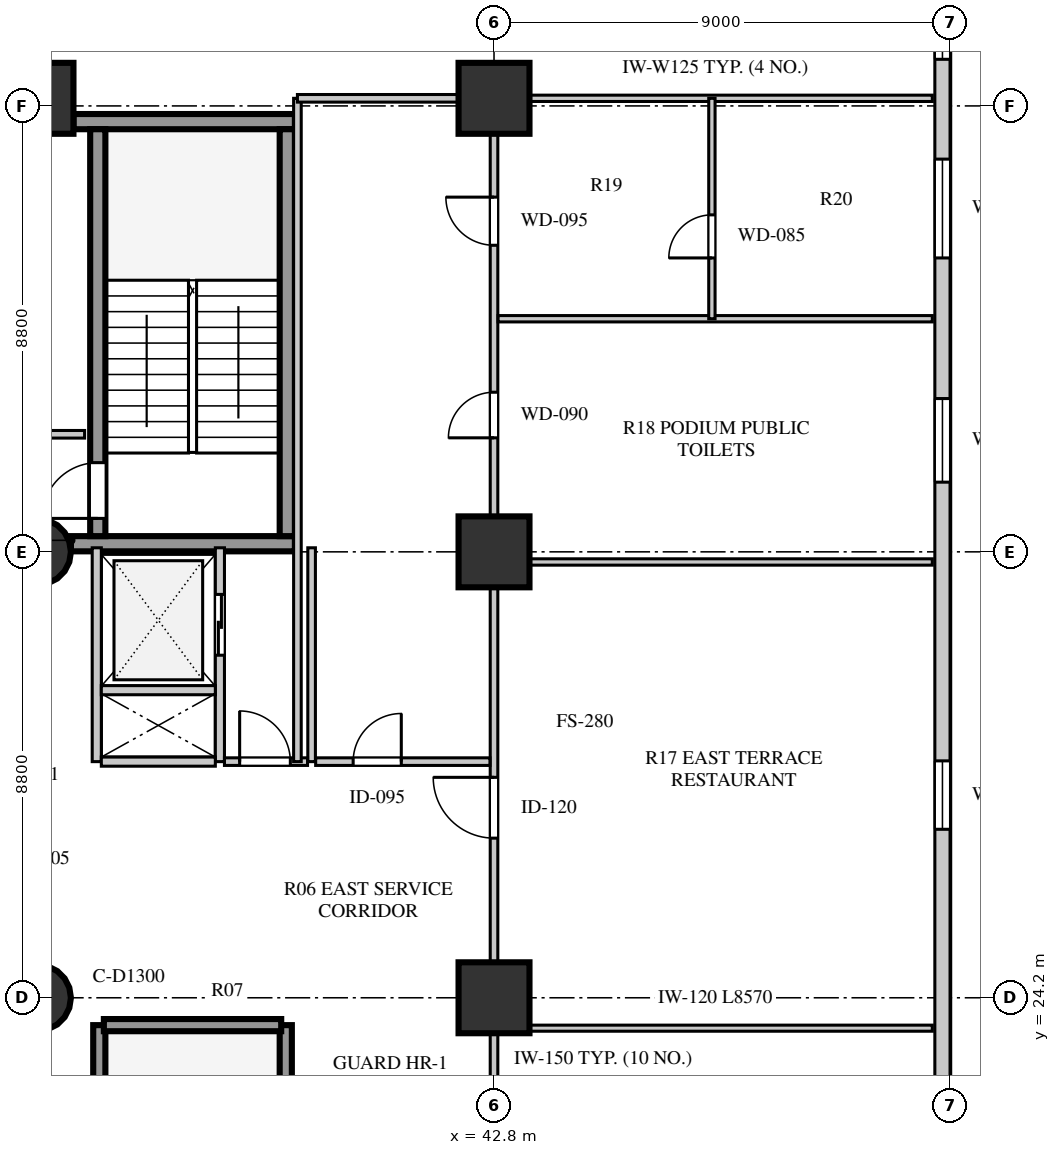
"""IFC4 building model, lengths in metres.
Left out: names, types, materials, properties, quantities, classifications, styles, units other than length and angle.
Written with IfcOpenShell. Run it as: python <this file> out.ifc"""

import sys

from ifc_helpers import new_model, si_unit, direction, frame, frame_2d, origin, origin_2d, place, context, subcontext, project, spatial, rectangle, circle, extrude, element, fill, save


model = new_model("IFC4")
c1 = context("Model", 3, precision=1e-05, world=origin(), true_north=direction((0.0, 1.0)))
c2 = subcontext(c1, "Body", "Model", "MODEL_VIEW")
j1 = project(units=[si_unit("LENGTHUNIT", "METRE"), si_unit("PLANEANGLEUNIT", "RADIAN")], contexts=[c1])
p1 = place(None, origin())
s1 = spatial("IfcSite", under=j1, at=p1, CompositionType="ELEMENT")
p2 = place(p1, origin())
s2 = spatial("IfcBuilding", under=s1, at=p2, CompositionType="ELEMENT")
p3 = place(p2, frame((0.0, 0.0, 8.0)))
s3 = spatial("IfcBuildingStorey", under=s2, at=p3, CompositionType="ELEMENT", Elevation=8.0)
p4 = place(p3, frame((34.45, 33.16, 0.0), z_axis=(0.0, 0.0, 1.0), x_axis=(1.0, 0.0, 0.0)))
e1 = element("IfcWall", 1, at=p4, inside=s3, PredefinedType="SHEAR", context=c2, shape_type="SweptSolid", body=[
    extrude(rectangle(XDim=4.42, YDim=0.3, at=frame_2d((2.21, 0.0))), origin(), (0.0, 0.0, 1.0), 4.22),
])
p5 = place(p3, frame((34.5, 41.49, 0.0), z_axis=(0.0, 0.0, 1.0), x_axis=(1.0, 0.0, 0.0)))
e2 = element("IfcWall", 2, at=p5, inside=s3, PredefinedType="SHEAR", context=c2, shape_type="SweptSolid", body=[
    extrude(rectangle(XDim=4.37, YDim=0.3, at=frame_2d((2.185, 0.0))), origin(), (0.0, 0.0, 1.0), 4.22),
])
p6 = place(p3, frame((34.98, 33.31, 0.0), z_axis=(0.0, 0.0, 1.0), x_axis=(0.0, 1.0, 0.0)))
e3 = element("IfcWall", 3, at=p6, inside=s3, PredefinedType="SHEAR", context=c2, shape_type="SweptSolid", body=[
    extrude(rectangle(XDim=8.03, YDim=0.3, at=frame_2d((4.015, 0.0))), origin(), (0.0, 0.0, 1.0), 4.22),
])
p7 = place(p6, frame((0.35, 0.0, 0.0)))
e4 = element("IfcOpeningElement", 4, at=p7, cuts=e3, PredefinedType="OPENING", context=c2, shape_type="SweptSolid", body=[
    extrude(rectangle(XDim=1.1, YDim=2.1, at=frame_2d((0.55, 1.05))), frame((0.0, 0.16, 0.0), z_axis=(0.0, -1.0, 0.0), x_axis=(1.0, 0.0, 0.0)), (0.0, 0.0, 1.0), 0.32),
])
p8 = place(p3, frame((38.72, 33.31, 0.0), z_axis=(0.0, 0.0, 1.0), x_axis=(0.0, 1.0, 0.0)))
e5 = element("IfcWall", 5, at=p8, inside=s3, PredefinedType="SHEAR", context=c2, shape_type="SweptSolid", body=[
    extrude(rectangle(XDim=8.03, YDim=0.3, at=frame_2d((4.015, 0.0))), origin(), (0.0, 0.0, 1.0), 4.22),
])
for number, where, z_axis, x_axis in (
    (6, (33.8, 24.2, 0.0), (0.0, 0.0, 1.0), (1.0, 0.0, 0.0)),
    (7, (33.8, 33.0, 0.0), (0.0, 0.0, 1.0), (1.0, 0.0, 0.0)),
):
    element("IfcColumn", number, at=place(p3, frame(where, z_axis=z_axis, x_axis=x_axis)), inside=s3, PredefinedType="COLUMN", context=c2, shape_type="SweptSolid", body=[
        extrude(circle(Radius=0.65, at=origin_2d()), origin(), (0.0, 0.0, 1.0), 4.22),
    ])
for number, where, z_axis, x_axis in (
    (8, (33.8, 41.95, 0.0), (0.0, 0.0, 1.0), (1.0, 0.0, 0.0)),
    (9, (42.8, 24.2, 0.0), (0.0, 0.0, 1.0), (1.0, 0.0, 0.0)),
    (10, (42.8, 33.0, 0.0), (0.0, 0.0, 1.0), (1.0, 0.0, 0.0)),
    (11, (42.8, 41.95, 0.0), (0.0, 0.0, 1.0), (1.0, 0.0, 0.0)),
):
    element("IfcColumn", number, at=place(p3, frame(where, z_axis=z_axis, x_axis=x_axis)), inside=s3, PredefinedType="COLUMN", context=c2, shape_type="SweptSolid", body=[
        extrude(rectangle(XDim=1.4, YDim=1.4, at=origin_2d()), origin(), (0.0, 0.0, 1.0), 4.22),
    ])
p9 = place(p3, frame((51.65, 12.4, 0.0), z_axis=(0.0, 0.0, 1.0), x_axis=(0.0, 1.0, 0.0)))
e12 = element("IfcWall", 12, at=p9, inside=s3, PredefinedType="STANDARD", context=c2, shape_type="SweptSolid", body=[
    extrude(rectangle(XDim=32.4, YDim=0.3, at=frame_2d((16.2, 0.0))), origin(), (0.0, 0.0, 1.0), 4.22),
])
p10 = place(p9, frame((0.88, 0.0, 0.8)))
e13 = element("IfcOpeningElement", 13, at=p10, cuts=e12, PredefinedType="OPENING", context=c2, shape_type="SweptSolid", body=[
    extrude(rectangle(XDim=1.2, YDim=1.75, at=frame_2d((0.6, 0.875))), frame((0.0, 0.16, 0.0), z_axis=(0.0, -1.0, 0.0), x_axis=(1.0, 0.0, 0.0)), (0.0, 0.0, 1.0), 0.32),
])
p11 = place(p9, frame((5.975, 0.0, 0.8)))
e14 = element("IfcOpeningElement", 14, at=p11, cuts=e12, PredefinedType="OPENING", context=c2, shape_type="SweptSolid", body=[
    extrude(rectangle(XDim=2.1, YDim=1.95, at=frame_2d((1.05, 0.975))), frame((0.0, 0.16, 0.0), z_axis=(0.0, -1.0, 0.0), x_axis=(1.0, 0.0, 0.0)), (0.0, 0.0, 1.0), 0.32),
])
p12 = place(p9, frame((15.125, 0.0, 0.8)))
e15 = element("IfcOpeningElement", 15, at=p12, cuts=e12, PredefinedType="OPENING", context=c2, shape_type="SweptSolid", body=[
    extrude(rectangle(XDim=1.35, YDim=1.9, at=frame_2d((0.675, 0.95))), frame((0.0, 0.16, 0.0), z_axis=(0.0, -1.0, 0.0), x_axis=(1.0, 0.0, 0.0)), (0.0, 0.0, 1.0), 0.32),
])
p13 = place(p9, frame((21.975, 0.0, 0.8)))
e16 = element("IfcOpeningElement", 16, at=p13, cuts=e12, PredefinedType="OPENING", context=c2, shape_type="SweptSolid", body=[
    extrude(rectangle(XDim=1.65, YDim=1.95, at=frame_2d((0.825, 0.975))), frame((0.0, 0.16, 0.0), z_axis=(0.0, -1.0, 0.0), x_axis=(1.0, 0.0, 0.0)), (0.0, 0.0, 1.0), 0.32),
])
p14 = place(p9, frame((26.4, 0.0, 0.8)))
e17 = element("IfcOpeningElement", 17, at=p14, cuts=e12, PredefinedType="OPENING", context=c2, shape_type="SweptSolid", body=[
    extrude(rectangle(XDim=1.95, YDim=2.0, at=frame_2d((0.975, 1.0))), frame((0.0, 0.16, 0.0), z_axis=(0.0, -1.0, 0.0), x_axis=(1.0, 0.0, 0.0)), (0.0, 0.0, 1.0), 0.32),
])
p15 = place(p9, frame((30.32, 0.0, 0.8)))
e18 = element("IfcOpeningElement", 18, at=p15, cuts=e12, PredefinedType="OPENING", context=c2, shape_type="SweptSolid", body=[
    extrude(rectangle(XDim=1.2, YDim=1.75, at=frame_2d((0.6, 0.875))), frame((0.0, 0.16, 0.0), z_axis=(0.0, -1.0, 0.0), x_axis=(1.0, 0.0, 0.0)), (0.0, 0.0, 1.0), 0.32),
])
p16 = place(p3, frame((34.96, 28.86, 0.0), z_axis=(0.0, 0.0, 1.0), x_axis=(0.0, 1.0, 0.0)))
e19 = element("IfcWall", 19, at=p16, inside=s3, PredefinedType="SOLIDWALL", context=c2, shape_type="SweptSolid", body=[
    extrude(rectangle(XDim=4.22, YDim=0.18, at=frame_2d((2.11, 0.0))), origin(), (0.0, 0.0, 1.0), 4.22),
])
p17 = place(p3, frame((37.39, 28.86, 0.0), z_axis=(0.0, 0.0, 1.0), x_axis=(0.0, 1.0, 0.0)))
e20 = element("IfcWall", 20, at=p17, inside=s3, PredefinedType="SOLIDWALL", context=c2, shape_type="SweptSolid", body=[
    extrude(rectangle(XDim=4.22, YDim=0.18, at=frame_2d((2.11, 0.0))), origin(), (0.0, 0.0, 1.0), 4.22),
])
p18 = place(p17, frame((2.1, 0.0, 0.0)))
e21 = element("IfcOpeningElement", 21, at=p18, cuts=e20, PredefinedType="OPENING", context=c2, shape_type="SweptSolid", body=[
    extrude(rectangle(XDim=1.2, YDim=2.12, at=frame_2d((0.6, 1.06))), frame((0.0, 0.1, 0.0), z_axis=(0.0, -1.0, 0.0), x_axis=(1.0, 0.0, 0.0)), (0.0, 0.0, 1.0), 0.2),
])
for number, where, z_axis, x_axis in (
    (22, (35.05, 28.86, 0.0), (0.0, 0.0, 1.0), (1.0, 0.0, 0.0)),
    (23, (35.05, 30.27, 0.0), (0.0, 0.0, 1.0), (1.0, 0.0, 0.0)),
):
    element("IfcWall", number, at=place(p3, frame(where, z_axis=z_axis, x_axis=x_axis)), inside=s3, PredefinedType="SOLIDWALL", context=c2, shape_type="SweptSolid", body=[
        extrude(rectangle(XDim=2.25, YDim=0.18, at=frame_2d((1.125, 0.0))), origin(), (0.0, 0.0, 1.0), 4.22),
    ])
p19 = place(p3, frame((39.2, 28.86, 0.0), z_axis=(0.0, 0.0, 1.0), x_axis=(0.0, 1.0, 0.0)))
e24 = element("IfcWall", 24, at=p19, inside=s3, PredefinedType="PARTITIONING", context=c2, shape_type="SweptSolid", body=[
    extrude(rectangle(XDim=4.22, YDim=0.15, at=frame_2d((2.11, 0.0))), origin(), (0.0, 0.0, 1.0), 4.22),
])
p20 = place(p3, frame((37.48, 28.86, 0.0), z_axis=(0.0, 0.0, 1.0), x_axis=(1.0, 0.0, 0.0)))
e25 = element("IfcWall", 25, at=p20, inside=s3, PredefinedType="PARTITIONING", context=c2, shape_type="SweptSolid", body=[
    extrude(rectangle(XDim=1.64, YDim=0.15, at=frame_2d((0.82, 0.0))), origin(), (0.0, 0.0, 1.0), 4.22),
])
p21 = place(p20, frame((0.3, 0.0, 0.0)))
e26 = element("IfcOpeningElement", 26, at=p21, cuts=e25, PredefinedType="OPENING", context=c2, shape_type="SweptSolid", body=[
    extrude(rectangle(XDim=1.0, YDim=2.1, at=frame_2d((0.5, 1.05))), frame((0.0, 0.085, 0.0), z_axis=(0.0, -1.0, 0.0), x_axis=(1.0, 0.0, 0.0)), (0.0, 0.0, 1.0), 0.17),
])
p22 = place(p3, frame((35.01, 15.54, 0.0), z_axis=(0.0, 0.0, 1.0), x_axis=(0.0, 1.0, 0.0)))
e27 = element("IfcWall", 27, at=p22, inside=s3, PredefinedType="SHEAR", context=c2, shape_type="SweptSolid", body=[
    extrude(rectangle(XDim=8.12, YDim=0.24, at=frame_2d((4.06, 0.0))), origin(), (0.0, 0.0, 1.0), 4.5),
])
p23 = place(p22, frame((0.45, 0.0, 0.0)))
e28 = element("IfcOpeningElement", 28, at=p23, cuts=e27, PredefinedType="OPENING", context=c2, shape_type="SweptSolid", body=[
    extrude(rectangle(XDim=1.1, YDim=2.1, at=frame_2d((0.55, 1.05))), frame((0.0, 0.13, 0.0), z_axis=(0.0, -1.0, 0.0), x_axis=(1.0, 0.0, 0.0)), (0.0, 0.0, 1.0), 0.26),
])
p24 = place(p3, frame((38.69, 15.54, 0.0), z_axis=(0.0, 0.0, 1.0), x_axis=(0.0, 1.0, 0.0)))
e29 = element("IfcWall", 29, at=p24, inside=s3, PredefinedType="SHEAR", context=c2, shape_type="SweptSolid", body=[
    extrude(rectangle(XDim=8.12, YDim=0.24, at=frame_2d((4.06, 0.0))), origin(), (0.0, 0.0, 1.0), 4.5),
])
p25 = place(p3, frame((35.1, 23.66, 0.0), z_axis=(0.0, 0.0, 1.0), x_axis=(1.0, 0.0, 0.0)))
e30 = element("IfcWall", 30, at=p25, inside=s3, PredefinedType="SHEAR", context=c2, shape_type="SweptSolid", body=[
    extrude(rectangle(XDim=3.5, YDim=0.24, at=frame_2d((1.75, 0.0))), origin(), (0.0, 0.0, 1.0), 4.5),
])
p26 = place(p3, frame((27.5, 35.32, 0.0), z_axis=(0.0, 0.0, 1.0), x_axis=(1.0, 0.0, 0.0)))
e31 = element("IfcWall", 31, at=p26, inside=s3, PredefinedType="PARTITIONING", context=c2, shape_type="SweptSolid", body=[
    extrude(rectangle(XDim=7.22, YDim=0.15, at=frame_2d((3.61, 0.0))), origin(), (0.0, 0.0, 1.0), 4.22),
])
p27 = place(p26, frame((2.4, 0.0, 0.0)))
e32 = element("IfcOpeningElement", 32, at=p27, cuts=e31, PredefinedType="OPENING", context=c2, shape_type="SweptSolid", body=[
    extrude(rectangle(XDim=1.2, YDim=2.1, at=frame_2d((0.6, 1.05))), frame((0.0, 0.085, 0.0), z_axis=(0.0, -1.0, 0.0), x_axis=(1.0, 0.0, 0.0)), (0.0, 0.0, 1.0), 0.17),
])
p28 = place(p3, frame((42.8, 15.25, 0.0), z_axis=(0.0, 0.0, 1.0), x_axis=(0.0, 1.0, 0.0)))
e33 = element("IfcWall", 33, at=p28, inside=s3, PredefinedType="PARTITIONING", context=c2, shape_type="SweptSolid", body=[
    extrude(rectangle(XDim=26.7, YDim=0.15, at=frame_2d((13.35, 0.0))), origin(), (0.0, 0.0, 1.0), 3.42),
])
p29 = place(p28, frame((3.2, 0.0, 0.0)))
e34 = element("IfcOpeningElement", 34, at=p29, cuts=e33, PredefinedType="OPENING", context=c2, shape_type="SweptSolid", body=[
    extrude(rectangle(XDim=1.1, YDim=2.08, at=frame_2d((0.55, 1.04))), frame((0.0, 0.085, 0.0), z_axis=(0.0, -1.0, 0.0), x_axis=(1.0, 0.0, 0.0)), (0.0, 0.0, 1.0), 0.17),
])
p30 = place(p28, frame((12.1, 0.0, 0.0)))
e35 = element("IfcOpeningElement", 35, at=p30, cuts=e33, PredefinedType="OPENING", context=c2, shape_type="SweptSolid", body=[
    extrude(rectangle(XDim=1.2, YDim=2.1, at=frame_2d((0.6, 1.05))), frame((0.0, 0.085, 0.0), z_axis=(0.0, -1.0, 0.0), x_axis=(1.0, 0.0, 0.0)), (0.0, 0.0, 1.0), 0.17),
])
p31 = place(p28, frame((20.0, 0.0, 0.0)))
e36 = element("IfcOpeningElement", 36, at=p31, cuts=e33, PredefinedType="OPENING", context=c2, shape_type="SweptSolid", body=[
    extrude(rectangle(XDim=0.9, YDim=2.05, at=frame_2d((0.45, 1.025))), frame((0.0, 0.085, 0.0), z_axis=(0.0, -1.0, 0.0), x_axis=(1.0, 0.0, 0.0)), (0.0, 0.0, 1.0), 0.17),
])
p32 = place(p28, frame((23.8, 0.0, 0.0)))
e37 = element("IfcOpeningElement", 37, at=p32, cuts=e33, PredefinedType="OPENING", context=c2, shape_type="SweptSolid", body=[
    extrude(rectangle(XDim=0.95, YDim=2.05, at=frame_2d((0.475, 1.025))), frame((0.0, 0.085, 0.0), z_axis=(0.0, -1.0, 0.0), x_axis=(1.0, 0.0, 0.0)), (0.0, 0.0, 1.0), 0.17),
])
p33 = place(p3, frame((42.88, 41.95, 0.0), z_axis=(0.0, 0.0, 1.0), x_axis=(1.0, 0.0, 0.0)))
e38 = element("IfcWall", 38, at=p33, inside=s3, PredefinedType="PLUMBINGWALL", context=c2, shape_type="SweptSolid", body=[
    extrude(rectangle(XDim=8.57, YDim=0.125, at=frame_2d((4.285, 0.0))), origin(), (0.0, 0.0, 1.0), 3.72),
])
p34 = place(p3, frame((39.28, 28.86, 0.0), z_axis=(0.0, 0.0, 1.0), x_axis=(1.0, 0.0, 0.0)))
e39 = element("IfcWall", 39, at=p34, inside=s3, PredefinedType="PARTITIONING", context=c2, shape_type="SweptSolid", body=[
    extrude(rectangle(XDim=3.44, YDim=0.15, at=frame_2d((1.72, 0.0))), origin(), (0.0, 0.0, 1.0), 4.22),
])
p35 = place(p34, frame((0.74, 0.0, 0.0)))
e40 = element("IfcOpeningElement", 40, at=p35, cuts=e39, PredefinedType="OPENING", context=c2, shape_type="SweptSolid", body=[
    extrude(rectangle(XDim=0.95, YDim=2.08, at=frame_2d((0.475, 1.04))), frame((0.0, 0.085, 0.0), z_axis=(0.0, -1.0, 0.0), x_axis=(1.0, 0.0, 0.0)), (0.0, 0.0, 1.0), 0.17),
])
p36 = place(p3, frame((38.92, 28.86, 0.0), z_axis=(0.0, 0.0, 1.0), x_axis=(0.0, 1.0, 0.0)))
e41 = element("IfcWall", 41, at=p36, inside=s3, PredefinedType="PARTITIONING", context=c2, shape_type="SweptSolid", body=[
    extrude(rectangle(XDim=13.09, YDim=0.15, at=frame_2d((6.545, 0.0))), origin(), (0.0, 0.0, 1.0), 4.22),
])
p37 = place(p3, frame((38.92, 41.95, 0.0), z_axis=(0.0, 0.0, 1.0), x_axis=(1.0, 0.0, 0.0)))
e42 = element("IfcWall", 42, at=p37, inside=s3, PredefinedType="PARTITIONING", context=c2, shape_type="SweptSolid", body=[
    extrude(rectangle(XDim=3.88, YDim=0.15, at=frame_2d((1.94, 0.0))), origin(), (0.0, 0.0, 1.0), 3.42),
])
p38 = place(p3, frame((42.88, 23.6, 0.0), z_axis=(0.0, 0.0, 1.0), x_axis=(1.0, 0.0, 0.0)))
e43 = element("IfcWall", 43, at=p38, inside=s3, PredefinedType="PARTITIONING", context=c2, shape_type="SweptSolid", body=[
    extrude(rectangle(XDim=8.57, YDim=0.12, at=frame_2d((4.285, 0.0))), origin(), (0.0, 0.0, 1.0), 4.22),
])
p39 = place(p3, frame((42.88, 32.8, 0.0), z_axis=(0.0, 0.0, 1.0), x_axis=(1.0, 0.0, 0.0)))
e44 = element("IfcWall", 44, at=p39, inside=s3, PredefinedType="PLUMBINGWALL", context=c2, shape_type="SweptSolid", body=[
    extrude(rectangle(XDim=8.57, YDim=0.125, at=frame_2d((4.285, 0.0))), origin(), (0.0, 0.0, 1.0), 3.72),
])
p40 = place(p3, frame((42.88, 37.6, 0.0), z_axis=(0.0, 0.0, 1.0), x_axis=(1.0, 0.0, 0.0)))
e45 = element("IfcWall", 45, at=p40, inside=s3, PredefinedType="PLUMBINGWALL", context=c2, shape_type="SweptSolid", body=[
    extrude(rectangle(XDim=8.57, YDim=0.125, at=frame_2d((4.285, 0.0))), origin(), (0.0, 0.0, 1.0), 4.22),
])
p41 = place(p3, frame((47.1, 37.6, 0.0), z_axis=(0.0, 0.0, 1.0), x_axis=(0.0, 1.0, 0.0)))
e46 = element("IfcWall", 46, at=p41, inside=s3, PredefinedType="PLUMBINGWALL", context=c2, shape_type="SweptSolid", body=[
    extrude(rectangle(XDim=4.35, YDim=0.125, at=frame_2d((2.175, 0.0))), origin(), (0.0, 0.0, 1.0), 4.22),
])
p42 = place(p41, frame((1.2, 0.0, 0.0)))
e47 = element("IfcOpeningElement", 47, at=p42, cuts=e46, PredefinedType="OPENING", context=c2, shape_type="SweptSolid", body=[
    extrude(rectangle(XDim=0.85, YDim=2.05, at=frame_2d((0.425, 1.025))), frame((0.0, 0.073, 0.0), z_axis=(0.0, -1.0, 0.0), x_axis=(1.0, 0.0, 0.0)), (0.0, 0.0, 1.0), 0.145),
])
p43 = place(p12, origin())
e48 = element("IfcWindow", 48, at=p43, inside=s3, PartitioningType="SINGLE_PANEL", PredefinedType="WINDOW", context=c2, shape_type="SweptSolid", body=[
    extrude(rectangle(XDim=1.35, YDim=1.9, at=frame_2d((0.675, 0.95))), frame((0.0, 0.03, 0.0), z_axis=(0.0, -1.0, 0.0), x_axis=(1.0, 0.0, 0.0)), (0.0, 0.0, 1.0), 0.06),
])
fill(e15, e48)
p44 = place(p13, origin())
e49 = element("IfcWindow", 49, at=p44, inside=s3, PartitioningType="SINGLE_PANEL", PredefinedType="WINDOW", context=c2, shape_type="SweptSolid", body=[
    extrude(rectangle(XDim=1.65, YDim=1.95, at=frame_2d((0.825, 0.975))), frame((0.0, 0.03, 0.0), z_axis=(0.0, -1.0, 0.0), x_axis=(1.0, 0.0, 0.0)), (0.0, 0.0, 1.0), 0.06),
])
fill(e16, e49)
p45 = place(p14, origin())
e50 = element("IfcWindow", 50, at=p45, inside=s3, PartitioningType="SINGLE_PANEL", PredefinedType="WINDOW", context=c2, shape_type="SweptSolid", body=[
    extrude(rectangle(XDim=1.95, YDim=2.0, at=frame_2d((0.975, 1.0))), frame((0.0, 0.03, 0.0), z_axis=(0.0, -1.0, 0.0), x_axis=(1.0, 0.0, 0.0)), (0.0, 0.0, 1.0), 0.06),
])
fill(e17, e50)
p46 = place(p15, origin())
e51 = element("IfcWindow", 51, at=p46, inside=s3, PartitioningType="SINGLE_PANEL", PredefinedType="WINDOW", context=c2, shape_type="SweptSolid", body=[
    extrude(rectangle(XDim=1.2, YDim=1.75, at=frame_2d((0.6, 0.875))), frame((0.0, 0.03, 0.0), z_axis=(0.0, -1.0, 0.0), x_axis=(1.0, 0.0, 0.0)), (0.0, 0.0, 1.0), 0.06),
])
fill(e18, e51)
p47 = place(p7, origin())
e52 = element("IfcDoor", 52, at=p47, inside=s3, OperationType="SINGLE_SWING_LEFT", PredefinedType="DOOR", context=c2, shape_type="SweptSolid", body=[
    extrude(rectangle(XDim=1.1, YDim=2.1, at=frame_2d((0.55, 1.05))), frame((0.0, 0.025, 0.0), z_axis=(0.0, -1.0, 0.0), x_axis=(1.0, 0.0, 0.0)), (0.0, 0.0, 1.0), 0.05),
])
fill(e4, e52)
p48 = place(p18, frame((1.2, 0.0, 0.0), z_axis=(0.0, 0.0, 1.0), x_axis=(-1.0, 0.0, 0.0)))
e53 = element("IfcDoor", 53, at=p48, inside=s3, OperationType="DOUBLE_DOOR_SLIDING", PredefinedType="DOOR", context=c2, shape_type="SweptSolid", body=[
    extrude(rectangle(XDim=1.2, YDim=2.12, at=frame_2d((0.6, 1.06))), frame((0.0, 0.025, 0.0), z_axis=(0.0, -1.0, 0.0), x_axis=(1.0, 0.0, 0.0)), (0.0, 0.0, 1.0), 0.05),
])
fill(e21, e53)
p49 = place(p21, origin())
e54 = element("IfcDoor", 54, at=p49, inside=s3, OperationType="SINGLE_SWING_LEFT", PredefinedType="DOOR", context=c2, shape_type="SweptSolid", body=[
    extrude(rectangle(XDim=1.0, YDim=2.1, at=frame_2d((0.5, 1.05))), frame((0.0, 0.025, 0.0), z_axis=(0.0, -1.0, 0.0), x_axis=(1.0, 0.0, 0.0)), (0.0, 0.0, 1.0), 0.05),
])
fill(e26, e54)
p50 = place(p35, frame((0.95, 0.0, 0.0), z_axis=(0.0, 0.0, 1.0), x_axis=(-1.0, 0.0, 0.0)))
e55 = element("IfcDoor", 55, at=p50, inside=s3, OperationType="SINGLE_SWING_LEFT", PredefinedType="DOOR", context=c2, shape_type="SweptSolid", body=[
    extrude(rectangle(XDim=0.95, YDim=2.08, at=frame_2d((0.475, 1.04))), frame((0.0, 0.025, 0.0), z_axis=(0.0, -1.0, 0.0), x_axis=(1.0, 0.0, 0.0)), (0.0, 0.0, 1.0), 0.05),
])
fill(e40, e55)
p51 = place(p42, origin())
e56 = element("IfcDoor", 56, at=p51, inside=s3, OperationType="SINGLE_SWING_LEFT", PredefinedType="DOOR", context=c2, shape_type="SweptSolid", body=[
    extrude(rectangle(XDim=0.85, YDim=2.05, at=frame_2d((0.425, 1.025))), frame((0.0, 0.025, 0.0), z_axis=(0.0, -1.0, 0.0), x_axis=(1.0, 0.0, 0.0)), (0.0, 0.0, 1.0), 0.05),
])
fill(e47, e56)
p52 = place(p30, origin())
e57 = element("IfcDoor", 57, at=p52, inside=s3, OperationType="SINGLE_SWING_RIGHT", PredefinedType="DOOR", context=c2, shape_type="SweptSolid", body=[
    extrude(rectangle(XDim=1.2, YDim=2.1, at=frame_2d((0.6, 1.05))), frame((0.0, 0.025, 0.0), z_axis=(0.0, -1.0, 0.0), x_axis=(1.0, 0.0, 0.0)), (0.0, 0.0, 1.0), 0.05),
])
fill(e35, e57)
p53 = place(p31, origin())
e58 = element("IfcDoor", 58, at=p53, inside=s3, OperationType="SINGLE_SWING_LEFT", PredefinedType="DOOR", context=c2, shape_type="SweptSolid", body=[
    extrude(rectangle(XDim=0.9, YDim=2.05, at=frame_2d((0.45, 1.025))), frame((0.0, 0.025, 0.0), z_axis=(0.0, -1.0, 0.0), x_axis=(1.0, 0.0, 0.0)), (0.0, 0.0, 1.0), 0.05),
])
fill(e36, e58)
p54 = place(p32, origin())
e59 = element("IfcDoor", 59, at=p54, inside=s3, OperationType="SINGLE_SWING_RIGHT", PredefinedType="DOOR", context=c2, shape_type="SweptSolid", body=[
    extrude(rectangle(XDim=0.95, YDim=2.05, at=frame_2d((0.475, 1.025))), frame((0.0, 0.025, 0.0), z_axis=(0.0, -1.0, 0.0), x_axis=(1.0, 0.0, 0.0)), (0.0, 0.0, 1.0), 0.05),
])
fill(e37, e59)
save(model, sys.argv[1])
